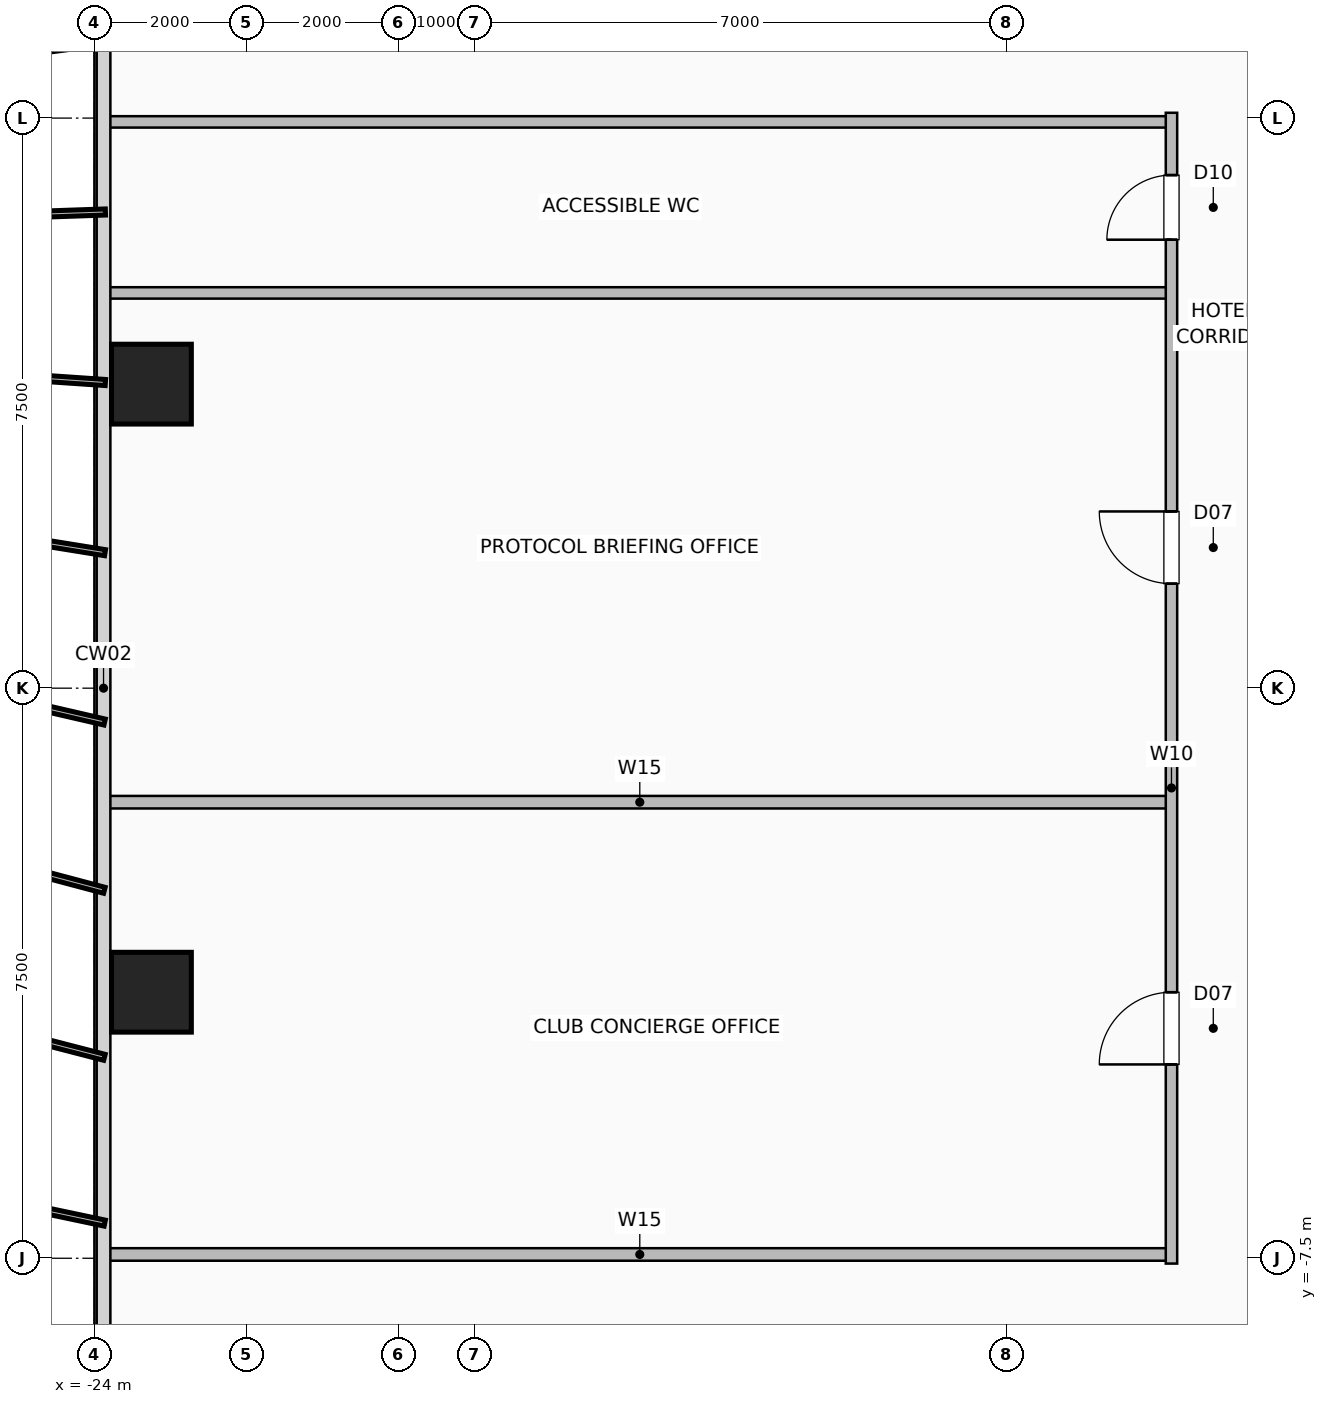
"""IFC4 building model, lengths in metres.
Left out: names, types, materials, properties, quantities, classifications, styles, units other than length and angle.
Written with IfcOpenShell. Run it as: python <this file> out.ifc"""

import sys

from ifc_helpers import new_model, si_unit, direction, frame, frame_2d, origin, origin_2d, place, context, subcontext, project, spatial, rectangle, hollow_rectangle, extrude, element, fill, save


model = new_model("IFC4")
c1 = context("Model", 3, precision=1e-05, world=origin(), true_north=direction((0.0, 1.0)))
c2 = subcontext(c1, "Body", "Model", "MODEL_VIEW")
j1 = project(units=[si_unit("LENGTHUNIT", "METRE"), si_unit("PLANEANGLEUNIT", "RADIAN")], contexts=[c1])
p1 = place(None, origin())
s1 = spatial("IfcSite", under=j1, at=p1, CompositionType="ELEMENT")
p2 = place(p1, origin())
s2 = spatial("IfcBuilding", under=s1, at=p2, CompositionType="ELEMENT")
p3 = place(p2, frame((0.0, 0.0, 58.5)))
s3 = spatial("IfcBuildingStorey", under=s2, at=p3, CompositionType="ELEMENT", Elevation=58.5)
for number, where, z_axis, x_axis in (
    (1, (-23.25, -4.0, 0.0), (0.0, 0.0, 1.0), (1.0, 0.0, 0.0)),
    (2, (-23.25, 4.0, 0.0), (0.0, 0.0, 1.0), (1.0, 0.0, 0.0)),
):
    element("IfcColumn", number, at=place(p3, frame(where, z_axis=z_axis, x_axis=x_axis)), inside=s3, PredefinedType="COLUMN", context=c2, shape_type="SweptSolid", body=[
        extrude(hollow_rectangle(XDim=1.05, YDim=1.05, WallThickness=0.05, at=origin_2d()), origin(), (0.0, 0.0, 1.0), 3.5),
    ])
for number, where, z_axis, x_axis in (
    (3, (-23.82, -7.45, 0.0), (0.0, 0.0, 1.0), (1.0, 0.0, 0.0)),
    (4, (-23.82, -1.5, 0.0), (0.0, 0.0, 1.0), (1.0, 0.0, 0.0)),
):
    element("IfcWall", number, at=place(p3, frame(where, z_axis=z_axis, x_axis=x_axis)), inside=s3, PredefinedType="PLUMBINGWALL", context=c2, shape_type="SweptSolid", body=[
        extrude(rectangle(XDim=13.99, YDim=0.165, at=frame_2d((6.995, 0.0))), origin(), (0.0, 0.0, 1.0), 3.25),
    ])
for number, where, z_axis, x_axis in (
    (5, (-23.82, 5.2, 0.0), (0.0, 0.0, 1.0), (1.0, 0.0, 0.0)),
    (6, (-23.82, 7.45, 0.0), (0.0, 0.0, 1.0), (1.0, 0.0, 0.0)),
):
    element("IfcWall", number, at=place(p3, frame(where, z_axis=z_axis, x_axis=x_axis)), inside=s3, PredefinedType="PARTITIONING", context=c2, shape_type="SweptSolid", body=[
        extrude(rectangle(XDim=13.99, YDim=0.15, at=frame_2d((6.995, 0.0))), origin(), (0.0, 0.0, 1.0), 3.25),
    ])
p4 = place(p3, frame((-9.83, -7.57, 0.0), z_axis=(0.0, 0.0, 1.0), x_axis=(0.0, 1.0, 0.0)))
e7 = element("IfcWall", 7, at=p4, inside=s3, PredefinedType="PARTITIONING", context=c2, shape_type="SweptSolid", body=[
    extrude(rectangle(XDim=15.14, YDim=0.15, at=frame_2d((7.57, 0.0))), origin(), (0.0, 0.0, 1.0), 3.25),
])
p5 = place(p4, frame((2.62, 0.0, 0.0)))
e8 = element("IfcOpeningElement", 8, at=p5, cuts=e7, PredefinedType="OPENING", context=c2, shape_type="SweptSolid", body=[
    extrude(rectangle(XDim=0.95, YDim=2.06, at=frame_2d((0.475, 1.03))), frame((0.0, 0.085, 0.0), z_axis=(0.0, -1.0, 0.0), x_axis=(1.0, 0.0, 0.0)), (0.0, 0.0, 1.0), 0.17),
])
p6 = place(p4, frame((8.945, 0.0, 0.0)))
e9 = element("IfcOpeningElement", 9, at=p6, cuts=e7, PredefinedType="OPENING", context=c2, shape_type="SweptSolid", body=[
    extrude(rectangle(XDim=0.95, YDim=2.06, at=frame_2d((0.475, 1.03))), frame((0.0, 0.085, 0.0), z_axis=(0.0, -1.0, 0.0), x_axis=(1.0, 0.0, 0.0)), (0.0, 0.0, 1.0), 0.17),
])
p7 = place(p4, frame((13.47, 0.0, 0.0)))
e10 = element("IfcOpeningElement", 10, at=p7, cuts=e7, PredefinedType="OPENING", context=c2, shape_type="SweptSolid", body=[
    extrude(rectangle(XDim=0.85, YDim=2.05, at=frame_2d((0.425, 1.025))), frame((0.0, 0.085, 0.0), z_axis=(0.0, -1.0, 0.0), x_axis=(1.0, 0.0, 0.0)), (0.0, 0.0, 1.0), 0.17),
])
p8 = place(p5, origin())
e11 = element("IfcDoor", 11, at=p8, inside=s3, OperationType="SINGLE_SWING_LEFT", PredefinedType="DOOR", context=c2, shape_type="SweptSolid", body=[
    extrude(rectangle(XDim=0.95, YDim=2.06, at=frame_2d((0.475, 1.03))), frame((0.0, 0.025, 0.0), z_axis=(0.0, -1.0, 0.0), x_axis=(1.0, 0.0, 0.0)), (0.0, 0.0, 1.0), 0.05),
])
fill(e8, e11)
p9 = place(p6, origin())
e12 = element("IfcDoor", 12, at=p9, inside=s3, OperationType="SINGLE_SWING_RIGHT", PredefinedType="DOOR", context=c2, shape_type="SweptSolid", body=[
    extrude(rectangle(XDim=0.95, YDim=2.06, at=frame_2d((0.475, 1.03))), frame((0.0, 0.025, 0.0), z_axis=(0.0, -1.0, 0.0), x_axis=(1.0, 0.0, 0.0)), (0.0, 0.0, 1.0), 0.05),
])
fill(e9, e12)
p10 = place(p7, origin())
e13 = element("IfcDoor", 13, at=p10, inside=s3, OperationType="SINGLE_SWING_LEFT", PredefinedType="DOOR", context=c2, shape_type="SweptSolid", body=[
    extrude(rectangle(XDim=0.85, YDim=2.05, at=frame_2d((0.425, 1.025))), frame((0.0, 0.025, 0.0), z_axis=(0.0, -1.0, 0.0), x_axis=(1.0, 0.0, 0.0)), (0.0, 0.0, 1.0), 0.05),
])
fill(e10, e13)
save(model, sys.argv[1])
